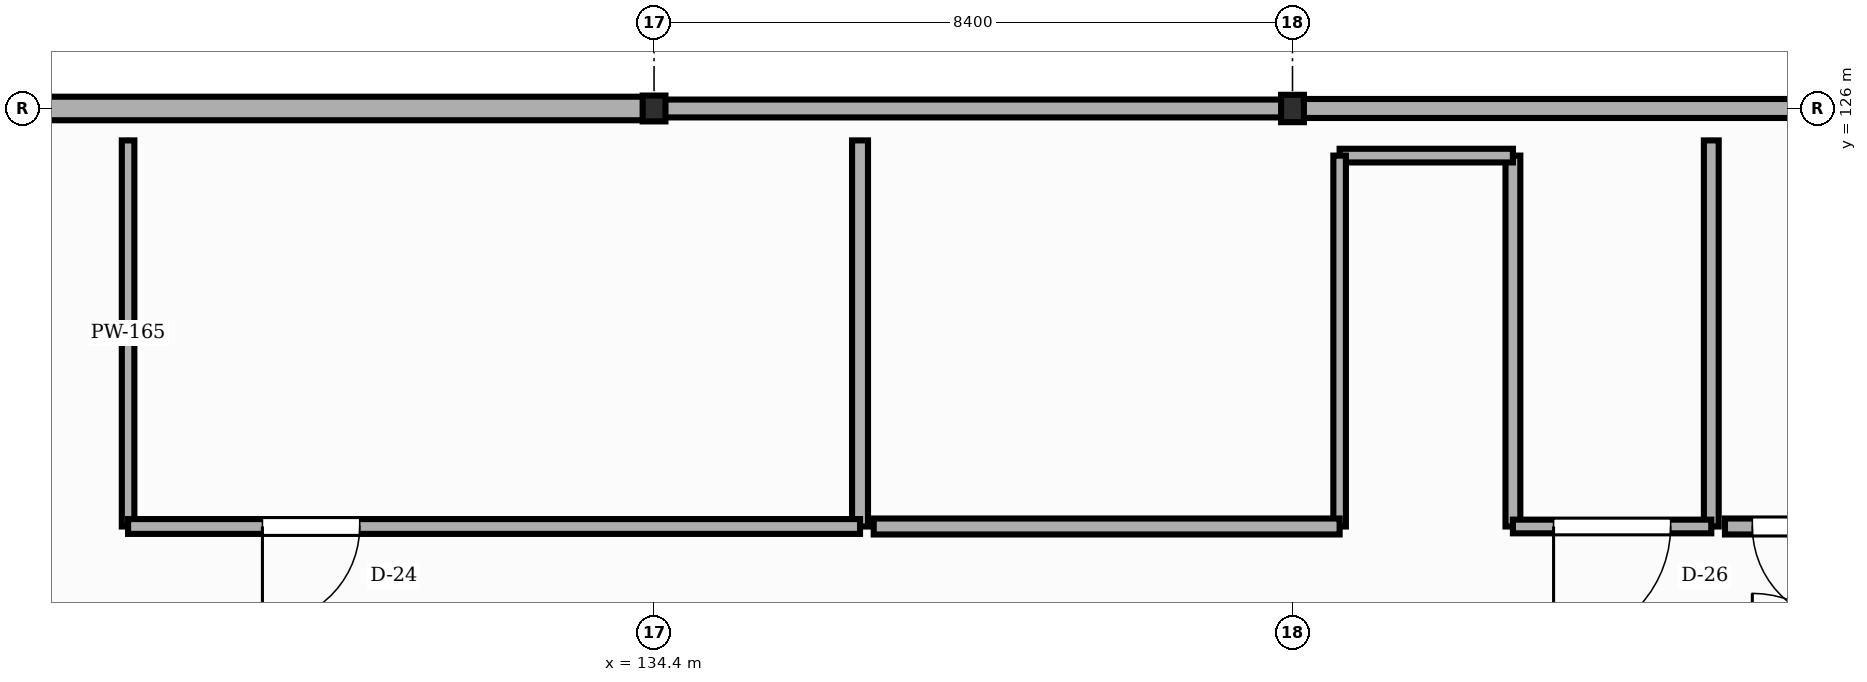
"""IFC4 building model, lengths in metres.
Left out: names, types, materials, properties, quantities, classifications, styles, units other than length and angle.
Written with IfcOpenShell. Run it as: python <this file> out.ifc"""

import sys

from ifc_helpers import new_model, si_unit, direction, frame, frame_2d, origin, origin_2d, place, context, subcontext, project, spatial, rectangle, i_section, extrude, element, fill, save


model = new_model("IFC4")
c1 = context("Model", 3, precision=1e-05, world=origin(), true_north=direction((0.0, 1.0)))
c2 = subcontext(c1, "Body", "Model", "MODEL_VIEW")
j1 = project(units=[si_unit("LENGTHUNIT", "METRE"), si_unit("PLANEANGLEUNIT", "RADIAN")], contexts=[c1])
p1 = place(None, origin())
s1 = spatial("IfcSite", under=j1, at=p1, CompositionType="ELEMENT")
p2 = place(p1, origin())
s2 = spatial("IfcBuilding", under=s1, at=p2, CompositionType="ELEMENT")
p3 = place(p2, frame((0.0, 0.0, 26.1)))
s3 = spatial("IfcBuildingStorey", under=s2, at=p3, CompositionType="ELEMENT", Elevation=26.1)
p4 = place(p3, frame((134.4, 126.0, 0.0), z_axis=(0.0, 0.0, 1.0), x_axis=(1.0, 0.0, 0.0)))
e1 = element("IfcColumn", 1, at=p4, inside=s3, PredefinedType="COLUMN", context=c2, shape_type="SweptSolid", body=[
    extrude(i_section(OverallWidth=0.3, OverallDepth=0.34, WebThickness=0.012, FlangeThickness=0.021, FilletRadius=0.027, at=origin_2d()), origin(), (0.0, 0.0, 1.0), 4.05),
])
p5 = place(p3, frame((142.8, 126.0, 0.0), z_axis=(0.0, 0.0, 1.0), x_axis=(1.0, 0.0, 0.0)))
e2 = element("IfcColumn", 2, at=p5, inside=s3, PredefinedType="COLUMN", context=c2, shape_type="SweptSolid", body=[
    extrude(i_section(OverallWidth=0.3, OverallDepth=0.36, WebThickness=0.012, FlangeThickness=0.022, FilletRadius=0.027, at=origin_2d()), origin(), (0.0, 0.0, 1.0), 4.05),
])
p6 = place(p3, frame((151.192, 126.0, 0.0), z_axis=(0.0, 0.0, 1.0), x_axis=(-1.0, 0.0, 0.0)))
e3 = element("IfcWall", 3, at=p6, inside=s3, PredefinedType="STANDARD", context=c2, shape_type="SweptSolid", body=[
    extrude(rectangle(XDim=8.384, YDim=0.25, at=frame_2d((4.192, 0.0))), origin(), (0.0, 0.0, 1.0), 3.497),
])
p7 = place(p3, frame((142.792, 126.0, 0.0), z_axis=(0.0, 0.0, 1.0), x_axis=(-1.0, 0.0, 0.0)))
e4 = element("IfcWall", 4, at=p7, inside=s3, PredefinedType="STANDARD", context=c2, shape_type="SweptSolid", body=[
    extrude(rectangle(XDim=8.384, YDim=0.235, at=frame_2d((4.192, 0.0))), origin(), (0.0, 0.0, 1.0), 3.527),
])
p8 = place(p3, frame((134.392, 126.0, 0.0), z_axis=(0.0, 0.0, 1.0), x_axis=(-1.0, 0.0, 0.0)))
e5 = element("IfcWall", 5, at=p8, inside=s3, PredefinedType="STANDARD", context=c2, shape_type="SweptSolid", body=[
    extrude(rectangle(XDim=8.384, YDim=0.31, at=frame_2d((4.192, 0.0))), origin(), (0.0, 0.0, 1.0), 3.497),
])
p9 = place(p3, frame((127.48, 120.5, -0.004), z_axis=(0.0, 0.0, 1.0), x_axis=(0.0, 1.0, 0.0)))
e6 = element("IfcWall", 6, at=p9, inside=s3, PredefinedType="STANDARD", context=c2, shape_type="SweptSolid", body=[
    extrude(rectangle(XDim=5.08, YDim=0.165, at=frame_2d((2.54, 0.0))), origin(), (0.0, 0.0, 1.0), 3.854),
])
p10 = place(p3, frame((137.11, 125.58, -0.004), z_axis=(0.0, 0.0, 1.0), x_axis=(0.0, -1.0, 0.0)))
e7 = element("IfcWall", 7, at=p10, inside=s3, PredefinedType="STANDARD", context=c2, shape_type="SweptSolid", body=[
    extrude(rectangle(XDim=5.08, YDim=0.21, at=frame_2d((2.54, 0.0))), origin(), (0.0, 0.0, 1.0), 3.621),
])
p11 = place(p3, frame((137.11, 120.5, -0.004), z_axis=(0.0, 0.0, 1.0), x_axis=(-1.0, 0.0, 0.0)))
e8 = element("IfcWall", 8, at=p11, inside=s3, PredefinedType="STANDARD", context=c2, shape_type="SweptSolid", body=[
    extrude(rectangle(XDim=9.63, YDim=0.195, at=frame_2d((4.815, 0.0))), origin(), (0.0, 0.0, 1.0), 3.854),
])
p12 = place(p11, frame((6.583, 0.0, 0.0)))
e9 = element("IfcOpeningElement", 9, at=p12, cuts=e8, PredefinedType="OPENING", context=c2, shape_type="SweptSolid", body=[
    extrude(rectangle(XDim=1.28, YDim=2.22, at=frame_2d((0.64, 1.11))), frame((0.0, 0.107, 0.0), z_axis=(0.0, -1.0, 0.0), x_axis=(1.0, 0.0, 0.0)), (0.0, 0.0, 1.0), 0.215),
])
p13 = place(p3, frame((145.7, 120.5, -0.004), z_axis=(0.0, 0.0, 1.0), x_axis=(0.0, 1.0, 0.0)))
e10 = element("IfcWall", 10, at=p13, inside=s3, PredefinedType="STANDARD", context=c2, shape_type="SweptSolid", body=[
    extrude(rectangle(XDim=4.88, YDim=0.195, at=frame_2d((2.44, 0.0))), origin(), (0.0, 0.0, 1.0), 3.641),
])
p14 = place(p3, frame((145.7, 125.38, -0.004), z_axis=(0.0, 0.0, 1.0), x_axis=(-1.0, 0.0, 0.0)))
e11 = element("IfcWall", 11, at=p14, inside=s3, PredefinedType="STANDARD", context=c2, shape_type="SweptSolid", body=[
    extrude(rectangle(XDim=2.28, YDim=0.18, at=frame_2d((1.14, 0.0))), origin(), (0.0, 0.0, 1.0), 3.854),
])
p15 = place(p3, frame((143.42, 125.38, -0.004), z_axis=(0.0, 0.0, 1.0), x_axis=(0.0, -1.0, 0.0)))
e12 = element("IfcWall", 12, at=p15, inside=s3, PredefinedType="STANDARD", context=c2, shape_type="SweptSolid", body=[
    extrude(rectangle(XDim=4.88, YDim=0.165, at=frame_2d((2.44, 0.0))), origin(), (0.0, 0.0, 1.0), 3.854),
])
p16 = place(p3, frame((143.42, 120.5, -0.004), z_axis=(0.0, 0.0, 1.0), x_axis=(-1.0, 0.0, 0.0)))
e13 = element("IfcWall", 13, at=p16, inside=s3, PredefinedType="STANDARD", context=c2, shape_type="SweptSolid", body=[
    extrude(rectangle(XDim=6.13, YDim=0.21, at=frame_2d((3.065, 0.0))), origin(), (0.0, 0.0, 1.0), 3.854),
])
p17 = place(p3, frame((148.31, 125.58, -0.004), z_axis=(0.0, 0.0, 1.0), x_axis=(0.0, -1.0, 0.0)))
e14 = element("IfcWall", 14, at=p17, inside=s3, PredefinedType="STANDARD", context=c2, shape_type="SweptSolid", body=[
    extrude(rectangle(XDim=5.08, YDim=0.195, at=frame_2d((2.54, 0.0))), origin(), (0.0, 0.0, 1.0), 3.641),
])
p18 = place(p3, frame((148.31, 120.5, -0.004), z_axis=(0.0, 0.0, 1.0), x_axis=(-1.0, 0.0, 0.0)))
e15 = element("IfcWall", 15, at=p18, inside=s3, PredefinedType="STANDARD", context=c2, shape_type="SweptSolid", body=[
    extrude(rectangle(XDim=2.61, YDim=0.18, at=frame_2d((1.305, 0.0))), origin(), (0.0, 0.0, 1.0), 3.854),
])
p19 = place(p18, frame((0.535, 0.0, 0.0)))
e16 = element("IfcOpeningElement", 16, at=p19, cuts=e15, PredefinedType="OPENING", context=c2, shape_type="SweptSolid", body=[
    extrude(rectangle(XDim=1.54, YDim=2.22, at=frame_2d((0.77, 1.11))), frame((0.0, 0.1, 0.0), z_axis=(0.0, -1.0, 0.0), x_axis=(1.0, 0.0, 0.0)), (0.0, 0.0, 1.0), 0.2),
])
p20 = place(p3, frame((150.86, 120.5, -0.004), z_axis=(0.0, 0.0, 1.0), x_axis=(-1.0, 0.0, 0.0)))
e17 = element("IfcWall", 17, at=p20, inside=s3, PredefinedType="STANDARD", context=c2, shape_type="SweptSolid", body=[
    extrude(rectangle(XDim=2.37, YDim=0.21, at=frame_2d((1.185, 0.0))), origin(), (0.0, 0.0, 1.0), 3.854),
])
p21 = place(p20, frame((0.73, 0.0, 0.0)))
e18 = element("IfcOpeningElement", 18, at=p21, cuts=e17, PredefinedType="OPENING", context=c2, shape_type="SweptSolid", body=[
    extrude(rectangle(XDim=1.28, YDim=2.3, at=frame_2d((0.64, 1.15))), frame((0.0, 0.115, 0.0), z_axis=(0.0, -1.0, 0.0), x_axis=(1.0, 0.0, 0.0)), (0.0, 0.0, 1.0), 0.23),
])
p22 = place(p12, origin())
e19 = element("IfcDoor", 19, at=p22, inside=s3, OperationType="SINGLE_SWING_RIGHT", PredefinedType="DOOR", context=c2, shape_type="SweptSolid", body=[
    extrude(rectangle(XDim=1.28, YDim=2.22, at=frame_2d((0.64, 1.11))), frame((0.0, 0.025, 0.0), z_axis=(0.0, -1.0, 0.0), x_axis=(1.0, 0.0, 0.0)), (0.0, 0.0, 1.0), 0.05),
])
fill(e9, e19)
p23 = place(p19, origin())
e20 = element("IfcDoor", 20, at=p23, inside=s3, OperationType="SINGLE_SWING_RIGHT", PredefinedType="DOOR", context=c2, shape_type="SweptSolid", body=[
    extrude(rectangle(XDim=1.54, YDim=2.22, at=frame_2d((0.77, 1.11))), frame((0.0, 0.025, 0.0), z_axis=(0.0, -1.0, 0.0), x_axis=(1.0, 0.0, 0.0)), (0.0, 0.0, 1.0), 0.05),
])
fill(e16, e20)
p24 = place(p21, origin())
e21 = element("IfcDoor", 21, at=p24, inside=s3, OperationType="SINGLE_SWING_LEFT", PredefinedType="DOOR", context=c2, shape_type="SweptSolid", body=[
    extrude(rectangle(XDim=1.28, YDim=2.3, at=frame_2d((0.64, 1.15))), frame((0.0, 0.025, 0.0), z_axis=(0.0, -1.0, 0.0), x_axis=(1.0, 0.0, 0.0)), (0.0, 0.0, 1.0), 0.05),
])
fill(e18, e21)
save(model, sys.argv[1])
